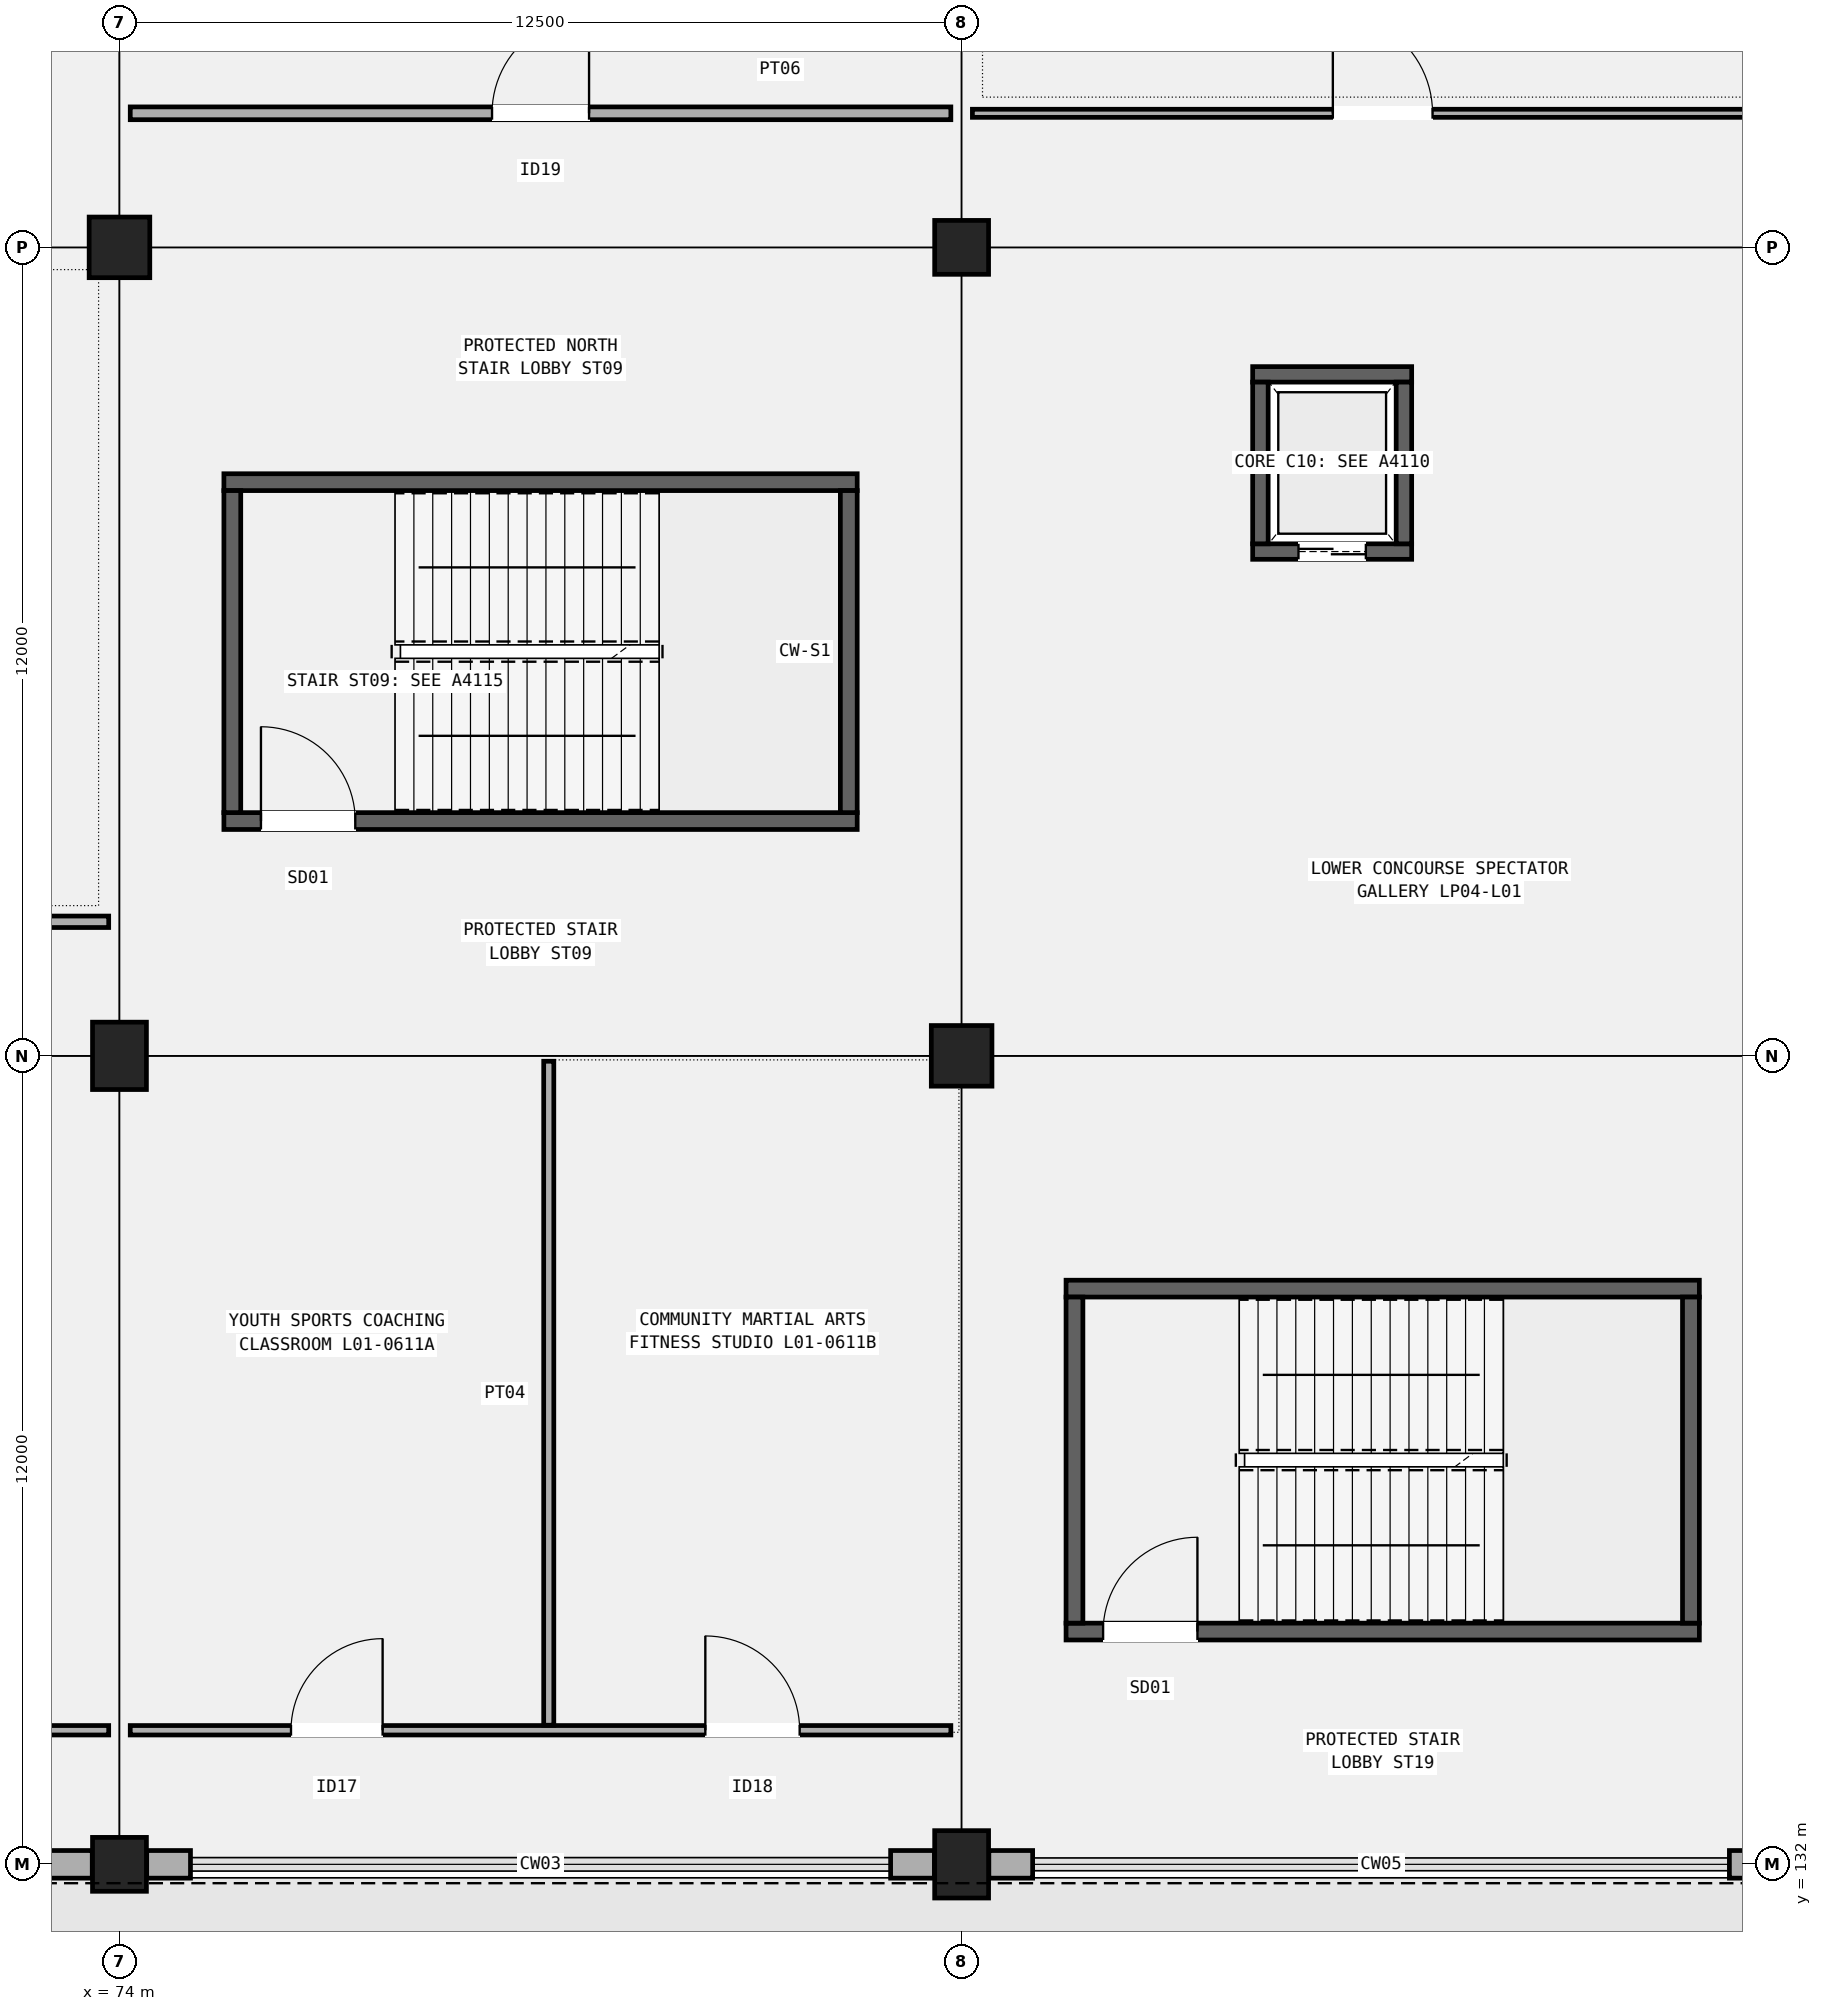
"""IFC4 building model, lengths in metres.
Left out: names, types, materials, properties, quantities, classifications, styles, units other than length and angle.
Written with IfcOpenShell. Run it as: python <this file> out.ifc"""

import sys

from ifc_helpers import new_model, si_unit, direction, frame, frame_2d, origin, origin_2d, place, context, subcontext, project, spatial, rectangle, extrude, element, fill, save


model = new_model("IFC4")
c1 = context("Model", 3, precision=1e-05, world=origin(), true_north=direction((0.0, 1.0)))
c2 = subcontext(c1, "Body", "Model", "MODEL_VIEW")
j1 = project(units=[si_unit("LENGTHUNIT", "METRE"), si_unit("PLANEANGLEUNIT", "RADIAN")], contexts=[c1])
p1 = place(None, origin())
s1 = spatial("IfcSite", under=j1, at=p1, CompositionType="ELEMENT")
p2 = place(p1, origin())
s2 = spatial("IfcBuilding", under=s1, at=p2, CompositionType="ELEMENT")
p3 = place(p2, frame((0.0, 0.0, 5.4)))
s3 = spatial("IfcBuildingStorey", under=s2, at=p3, CompositionType="ELEMENT", Elevation=5.4)
p4 = place(p3, frame((74.0, 132.0, 0.0), z_axis=(0.0, 0.0, 1.0), x_axis=(1.0, 0.0, 0.0)))
e1 = element("IfcColumn", 1, at=p4, inside=s3, PredefinedType="COLUMN", context=c2, shape_type="SweptSolid", body=[
    extrude(rectangle(XDim=0.8, YDim=0.8, at=origin_2d()), origin(), (0.0, 0.0, 1.0), 4.8),
])
p5 = place(p3, frame((74.0, 144.0, 0.0), z_axis=(0.0, 0.0, 1.0), x_axis=(1.0, 0.0, 0.0)))
e2 = element("IfcColumn", 2, at=p5, inside=s3, PredefinedType="COLUMN", context=c2, shape_type="SweptSolid", body=[
    extrude(rectangle(XDim=0.8, YDim=1.0, at=origin_2d()), origin(), (0.0, 0.0, 1.0), 4.8),
])
p6 = place(p3, frame((74.0, 156.0, 0.0), z_axis=(0.0, 0.0, 1.0), x_axis=(1.0, 0.0, 0.0)))
e3 = element("IfcColumn", 3, at=p6, inside=s3, PredefinedType="COLUMN", context=c2, shape_type="SweptSolid", body=[
    extrude(rectangle(XDim=0.9, YDim=0.9, at=origin_2d()), origin(), (0.0, 0.0, 1.0), 4.8),
])
p7 = place(p3, frame((86.5, 132.0, 0.0), z_axis=(0.0, 0.0, 1.0), x_axis=(1.0, 0.0, 0.0)))
e4 = element("IfcColumn", 4, at=p7, inside=s3, PredefinedType="COLUMN", context=c2, shape_type="SweptSolid", body=[
    extrude(rectangle(XDim=0.8, YDim=1.0, at=origin_2d()), origin(), (0.0, 0.0, 1.0), 4.8),
])
p8 = place(p3, frame((86.5, 144.0, 0.0), z_axis=(0.0, 0.0, 1.0), x_axis=(1.0, 0.0, 0.0)))
e5 = element("IfcColumn", 5, at=p8, inside=s3, PredefinedType="COLUMN", context=c2, shape_type="SweptSolid", body=[
    extrude(rectangle(XDim=0.9, YDim=0.9, at=origin_2d()), origin(), (0.0, 0.0, 1.0), 4.8),
])
p9 = place(p3, frame((86.5, 156.0, 0.0), z_axis=(0.0, 0.0, 1.0), x_axis=(1.0, 0.0, 0.0)))
e6 = element("IfcColumn", 6, at=p9, inside=s3, PredefinedType="COLUMN", context=c2, shape_type="SweptSolid", body=[
    extrude(rectangle(XDim=0.8, YDim=0.8, at=origin_2d()), origin(), (0.0, 0.0, 1.0), 4.8),
])
p10 = place(p3, frame((72.946, 132.0, 0.0), z_axis=(0.0, 0.0, 1.0), x_axis=(1.0, 0.0, 0.0)))
e7 = element("IfcWall", 7, at=p10, inside=s3, PredefinedType="SOLIDWALL", context=c2, shape_type="SweptSolid", body=[
    extrude(rectangle(XDim=0.65, YDim=0.41, at=frame_2d((0.325, 0.0))), origin(), (0.0, 0.0, 1.0), 4.15),
])
for number, where, z_axis, x_axis in (
    (8, (74.404, 132.0, 0.0), (0.0, 0.0, 1.0), (1.0, 0.0, 0.0)),
    (9, (85.446, 132.0, 0.0), (0.0, 0.0, 1.0), (1.0, 0.0, 0.0)),
):
    element("IfcWall", number, at=place(p3, frame(where, z_axis=z_axis, x_axis=x_axis)), inside=s3, PredefinedType="SOLIDWALL", context=c2, shape_type="SweptSolid", body=[
        extrude(rectangle(XDim=0.65, YDim=0.41, at=frame_2d((0.325, 0.0))), origin(), (0.0, 0.0, 1.0), 4.2),
    ])
for number, where, z_axis, x_axis in (
    (10, (86.904, 132.0, 0.0), (0.0, 0.0, 1.0), (1.0, 0.0, 0.0)),
    (11, (97.896, 132.0, 0.0), (0.0, 0.0, 1.0), (1.0, 0.0, 0.0)),
):
    element("IfcWall", number, at=place(p3, frame(where, z_axis=z_axis, x_axis=x_axis)), inside=s3, PredefinedType="SOLIDWALL", context=c2, shape_type="SweptSolid", body=[
        extrude(rectangle(XDim=0.65, YDim=0.41, at=frame_2d((0.325, 0.0))), origin(), (0.0, 0.0, 1.0), 4.15),
    ])
p11 = place(p3, frame((75.55, 147.485, 0.0), z_axis=(0.0, 0.0, 1.0), x_axis=(1.0, 0.0, 0.0)))
e12 = element("IfcWall", 12, at=p11, inside=s3, PredefinedType="SHEAR", context=c2, shape_type="SweptSolid", body=[
    extrude(rectangle(XDim=9.4, YDim=0.25, at=frame_2d((4.7, 0.0))), origin(), (0.0, 0.0, 1.0), 4.55),
])
p12 = place(p11, frame((0.55, 0.0, 0.0)))
e13 = element("IfcOpeningElement", 13, at=p12, cuts=e12, PredefinedType="OPENING", context=c2, shape_type="SweptSolid", body=[
    extrude(rectangle(XDim=1.4, YDim=2.15, at=frame_2d((0.7, 1.075))), frame((0.0, 0.135, 0.0), z_axis=(0.0, -1.0, 0.0), x_axis=(1.0, 0.0, 0.0)), (0.0, 0.0, 1.0), 0.27),
])
p13 = place(p3, frame((75.55, 152.515, 0.0), z_axis=(0.0, 0.0, 1.0), x_axis=(1.0, 0.0, 0.0)))
e14 = element("IfcWall", 14, at=p13, inside=s3, PredefinedType="SHEAR", context=c2, shape_type="SweptSolid", body=[
    extrude(rectangle(XDim=9.4, YDim=0.25, at=frame_2d((4.7, 0.0))), origin(), (0.0, 0.0, 1.0), 4.55),
])
for number, where, z_axis, x_axis in (
    (15, (75.675, 147.61, 0.0), (0.0, 0.0, 1.0), (0.0, 1.0, 0.0)),
    (16, (84.825, 147.61, 0.0), (0.0, 0.0, 1.0), (0.0, 1.0, 0.0)),
):
    element("IfcWall", number, at=place(p3, frame(where, z_axis=z_axis, x_axis=x_axis)), inside=s3, PredefinedType="SHEAR", context=c2, shape_type="SweptSolid", body=[
        extrude(rectangle(XDim=4.78, YDim=0.25, at=frame_2d((2.39, 0.0))), origin(), (0.0, 0.0, 1.0), 4.55),
    ])
p14 = place(p3, frame((88.05, 135.455, 0.0), z_axis=(0.0, 0.0, 1.0), x_axis=(1.0, 0.0, 0.0)))
e17 = element("IfcWall", 17, at=p14, inside=s3, PredefinedType="SHEAR", context=c2, shape_type="SweptSolid", body=[
    extrude(rectangle(XDim=9.4, YDim=0.25, at=frame_2d((4.7, 0.0))), origin(), (0.0, 0.0, 1.0), 4.55),
])
p15 = place(p14, frame((0.55, 0.0, 0.0)))
e18 = element("IfcOpeningElement", 18, at=p15, cuts=e17, PredefinedType="OPENING", context=c2, shape_type="SweptSolid", body=[
    extrude(rectangle(XDim=1.4, YDim=2.15, at=frame_2d((0.7, 1.075))), frame((0.0, 0.135, 0.0), z_axis=(0.0, -1.0, 0.0), x_axis=(1.0, 0.0, 0.0)), (0.0, 0.0, 1.0), 0.27),
])
p16 = place(p3, frame((88.05, 140.545, 0.0), z_axis=(0.0, 0.0, 1.0), x_axis=(1.0, 0.0, 0.0)))
e19 = element("IfcWall", 19, at=p16, inside=s3, PredefinedType="SHEAR", context=c2, shape_type="SweptSolid", body=[
    extrude(rectangle(XDim=9.4, YDim=0.25, at=frame_2d((4.7, 0.0))), origin(), (0.0, 0.0, 1.0), 4.55),
])
for number, where, z_axis, x_axis in (
    (20, (88.175, 135.58, 0.0), (0.0, 0.0, 1.0), (0.0, 1.0, 0.0)),
    (21, (97.325, 135.58, 0.0), (0.0, 0.0, 1.0), (0.0, 1.0, 0.0)),
):
    element("IfcWall", number, at=place(p3, frame(where, z_axis=z_axis, x_axis=x_axis)), inside=s3, PredefinedType="SHEAR", context=c2, shape_type="SweptSolid", body=[
        extrude(rectangle(XDim=4.84, YDim=0.25, at=frame_2d((2.42, 0.0))), origin(), (0.0, 0.0, 1.0), 4.55),
    ])
p17 = place(p3, frame((90.82, 151.485, 0.0), z_axis=(0.0, 0.0, 1.0), x_axis=(1.0, 0.0, 0.0)))
e22 = element("IfcWall", 22, at=p17, inside=s3, PredefinedType="SHEAR", context=c2, shape_type="SweptSolid", body=[
    extrude(rectangle(XDim=2.36, YDim=0.23, at=frame_2d((1.18, 0.0))), origin(), (0.0, 0.0, 1.0), 4.55),
])
p18 = place(p17, frame((0.68, 0.0, 0.0)))
e23 = element("IfcOpeningElement", 23, at=p18, cuts=e22, PredefinedType="OPENING", context=c2, shape_type="SweptSolid", body=[
    extrude(rectangle(XDim=1.0, YDim=2.15, at=frame_2d((0.5, 1.075))), frame((0.0, 0.125, 0.0), z_axis=(0.0, -1.0, 0.0), x_axis=(1.0, 0.0, 0.0)), (0.0, 0.0, 1.0), 0.25),
])
p19 = place(p3, frame((90.82, 154.115, 0.0), z_axis=(0.0, 0.0, 1.0), x_axis=(1.0, 0.0, 0.0)))
e24 = element("IfcWall", 24, at=p19, inside=s3, PredefinedType="SHEAR", context=c2, shape_type="SweptSolid", body=[
    extrude(rectangle(XDim=2.36, YDim=0.23, at=frame_2d((1.18, 0.0))), origin(), (0.0, 0.0, 1.0), 4.55),
])
for number, where, z_axis, x_axis in (
    (25, (90.935, 151.6, 0.0), (0.0, 0.0, 1.0), (0.0, 1.0, 0.0)),
    (26, (93.065, 151.6, 0.0), (0.0, 0.0, 1.0), (0.0, 1.0, 0.0)),
):
    element("IfcWall", number, at=place(p3, frame(where, z_axis=z_axis, x_axis=x_axis)), inside=s3, PredefinedType="SHEAR", context=c2, shape_type="SweptSolid", body=[
        extrude(rectangle(XDim=2.4, YDim=0.23, at=frame_2d((1.2, 0.0))), origin(), (0.0, 0.0, 1.0), 4.55),
    ])
p20 = place(p3, frame((61.66, 133.99, 0.0), z_axis=(0.0, 0.0, 1.0), x_axis=(1.0, 0.0, 0.0)))
e27 = element("IfcWall", 27, at=p20, inside=s3, PredefinedType="PARTITIONING", context=c2, shape_type="SweptSolid", body=[
    extrude(rectangle(XDim=12.18, YDim=0.14, at=frame_2d((6.09, 0.0))), origin(), (0.0, 0.0, 1.0), 3.92),
])
p21 = place(p20, frame((5.455, 0.0, 0.0)))
e28 = element("IfcOpeningElement", 28, at=p21, cuts=e27, PredefinedType="OPENING", context=c2, shape_type="SweptSolid", body=[
    extrude(rectangle(XDim=1.27, YDim=2.2, at=frame_2d((0.635, 1.1))), frame((0.0, 0.08, 0.0), z_axis=(0.0, -1.0, 0.0), x_axis=(1.0, 0.0, 0.0)), (0.0, 0.0, 1.0), 0.16),
])
p22 = place(p3, frame((61.66, 145.99, 0.0), z_axis=(0.0, 0.0, 1.0), x_axis=(1.0, 0.0, 0.0)))
e29 = element("IfcWall", 29, at=p22, inside=s3, PredefinedType="PARTITIONING", context=c2, shape_type="SweptSolid", body=[
    extrude(rectangle(XDim=12.18, YDim=0.17, at=frame_2d((6.09, 0.0))), origin(), (0.0, 0.0, 1.0), 3.92),
])
p23 = place(p22, frame((5.44, 0.0, 0.0)))
e30 = element("IfcOpeningElement", 30, at=p23, cuts=e29, PredefinedType="OPENING", context=c2, shape_type="SweptSolid", body=[
    extrude(rectangle(XDim=1.3, YDim=2.24, at=frame_2d((0.65, 1.12))), frame((0.0, 0.095, 0.0), z_axis=(0.0, -1.0, 0.0), x_axis=(1.0, 0.0, 0.0)), (0.0, 0.0, 1.0), 0.19),
])
p24 = place(p3, frame((74.16, 133.99, 0.0), z_axis=(0.0, 0.0, 1.0), x_axis=(1.0, 0.0, 0.0)))
e31 = element("IfcWall", 31, at=p24, inside=s3, PredefinedType="PARTITIONING", context=c2, shape_type="SweptSolid", body=[
    extrude(rectangle(XDim=12.18, YDim=0.14, at=frame_2d((6.09, 0.0))), origin(), (0.0, 0.0, 1.0), 3.92),
])
p25 = place(p24, frame((2.386, 0.0, 0.0)))
e32 = element("IfcOpeningElement", 32, at=p25, cuts=e31, PredefinedType="OPENING", context=c2, shape_type="SweptSolid", body=[
    extrude(rectangle(XDim=1.36, YDim=2.25, at=frame_2d((0.68, 1.125))), frame((0.0, 0.08, 0.0), z_axis=(0.0, -1.0, 0.0), x_axis=(1.0, 0.0, 0.0)), (0.0, 0.0, 1.0), 0.16),
])
p26 = place(p24, frame((8.536, 0.0, 0.0)))
e33 = element("IfcOpeningElement", 33, at=p26, cuts=e31, PredefinedType="OPENING", context=c2, shape_type="SweptSolid", body=[
    extrude(rectangle(XDim=1.4, YDim=2.24, at=frame_2d((0.7, 1.12))), frame((0.0, 0.08, 0.0), z_axis=(0.0, -1.0, 0.0), x_axis=(1.0, 0.0, 0.0)), (0.0, 0.0, 1.0), 0.16),
])
p27 = place(p3, frame((80.372, 134.065, 0.0), z_axis=(0.0, 0.0, 1.0), x_axis=(0.0, 1.0, 0.0)))
e34 = element("IfcWall", 34, at=p27, inside=s3, PredefinedType="PARTITIONING", context=c2, shape_type="SweptSolid", body=[
    extrude(rectangle(XDim=9.855, YDim=0.15, at=frame_2d((4.927, 0.0))), origin(), (0.0, 0.0, 1.0), 3.92),
])
p28 = place(p3, frame((74.16, 157.99, 0.0), z_axis=(0.0, 0.0, 1.0), x_axis=(1.0, 0.0, 0.0)))
e35 = element("IfcWall", 35, at=p28, inside=s3, PredefinedType="PARTITIONING", context=c2, shape_type="SweptSolid", body=[
    extrude(rectangle(XDim=12.18, YDim=0.19, at=frame_2d((6.09, 0.0))), origin(), (0.0, 0.0, 1.0), 3.92),
])
p29 = place(p28, frame((5.37, 0.0, 0.0)))
e36 = element("IfcOpeningElement", 36, at=p29, cuts=e35, PredefinedType="OPENING", context=c2, shape_type="SweptSolid", body=[
    extrude(rectangle(XDim=1.44, YDim=2.26, at=frame_2d((0.72, 1.13))), frame((0.0, 0.105, 0.0), z_axis=(0.0, -1.0, 0.0), x_axis=(1.0, 0.0, 0.0)), (0.0, 0.0, 1.0), 0.21),
])
p30 = place(p3, frame((86.66, 157.99, 0.0), z_axis=(0.0, 0.0, 1.0), x_axis=(1.0, 0.0, 0.0)))
e37 = element("IfcWall", 37, at=p30, inside=s3, PredefinedType="PARTITIONING", context=c2, shape_type="SweptSolid", body=[
    extrude(rectangle(XDim=12.18, YDim=0.12, at=frame_2d((6.09, 0.0))), origin(), (0.0, 0.0, 1.0), 3.92),
])
p31 = place(p30, frame((5.35, 0.0, 0.0)))
e38 = element("IfcOpeningElement", 38, at=p31, cuts=e37, PredefinedType="OPENING", context=c2, shape_type="SweptSolid", body=[
    extrude(rectangle(XDim=1.48, YDim=2.24, at=frame_2d((0.74, 1.12))), frame((0.0, 0.07, 0.0), z_axis=(0.0, -1.0, 0.0), x_axis=(1.0, 0.0, 0.0)), (0.0, 0.0, 1.0), 0.14),
])
p32 = place(p12, origin())
e39 = element("IfcDoor", 39, at=p32, inside=s3, OperationType="SINGLE_SWING_LEFT", PredefinedType="DOOR", context=c2, shape_type="SweptSolid", body=[
    extrude(rectangle(XDim=1.4, YDim=2.15, at=frame_2d((0.7, 1.075))), frame((0.0, 0.025, 0.0), z_axis=(0.0, -1.0, 0.0), x_axis=(1.0, 0.0, 0.0)), (0.0, 0.0, 1.0), 0.05),
])
fill(e13, e39)
p33 = place(p15, origin())
e40 = element("IfcDoor", 40, at=p33, inside=s3, OperationType="SINGLE_SWING_RIGHT", PredefinedType="DOOR", context=c2, shape_type="SweptSolid", body=[
    extrude(rectangle(XDim=1.4, YDim=2.15, at=frame_2d((0.7, 1.075))), frame((0.0, 0.025, 0.0), z_axis=(0.0, -1.0, 0.0), x_axis=(1.0, 0.0, 0.0)), (0.0, 0.0, 1.0), 0.05),
])
fill(e18, e40)
p34 = place(p18, origin())
e41 = element("IfcDoor", 41, at=p34, inside=s3, OperationType="DOUBLE_DOOR_SLIDING", PredefinedType="DOOR", context=c2, shape_type="SweptSolid", body=[
    extrude(rectangle(XDim=1.0, YDim=2.15, at=frame_2d((0.5, 1.075))), frame((0.0, 0.025, 0.0), z_axis=(0.0, -1.0, 0.0), x_axis=(1.0, 0.0, 0.0)), (0.0, 0.0, 1.0), 0.05),
])
fill(e23, e41)
p35 = place(p25, origin())
e42 = element("IfcDoor", 42, at=p35, inside=s3, OperationType="SINGLE_SWING_RIGHT", PredefinedType="DOOR", context=c2, shape_type="SweptSolid", body=[
    extrude(rectangle(XDim=1.36, YDim=2.25, at=frame_2d((0.68, 1.125))), frame((0.0, 0.025, 0.0), z_axis=(0.0, -1.0, 0.0), x_axis=(1.0, 0.0, 0.0)), (0.0, 0.0, 1.0), 0.05),
])
fill(e32, e42)
p36 = place(p26, origin())
e43 = element("IfcDoor", 43, at=p36, inside=s3, OperationType="SINGLE_SWING_LEFT", PredefinedType="DOOR", context=c2, shape_type="SweptSolid", body=[
    extrude(rectangle(XDim=1.4, YDim=2.24, at=frame_2d((0.7, 1.12))), frame((0.0, 0.025, 0.0), z_axis=(0.0, -1.0, 0.0), x_axis=(1.0, 0.0, 0.0)), (0.0, 0.0, 1.0), 0.05),
])
fill(e33, e43)
p37 = place(p29, origin())
e44 = element("IfcDoor", 44, at=p37, inside=s3, OperationType="SINGLE_SWING_RIGHT", PredefinedType="DOOR", context=c2, shape_type="SweptSolid", body=[
    extrude(rectangle(XDim=1.44, YDim=2.26, at=frame_2d((0.72, 1.13))), frame((0.0, 0.025, 0.0), z_axis=(0.0, -1.0, 0.0), x_axis=(1.0, 0.0, 0.0)), (0.0, 0.0, 1.0), 0.05),
])
fill(e36, e44)
p38 = place(p31, origin())
e45 = element("IfcDoor", 45, at=p38, inside=s3, OperationType="SINGLE_SWING_LEFT", PredefinedType="DOOR", context=c2, shape_type="SweptSolid", body=[
    extrude(rectangle(XDim=1.48, YDim=2.24, at=frame_2d((0.74, 1.12))), frame((0.0, 0.025, 0.0), z_axis=(0.0, -1.0, 0.0), x_axis=(1.0, 0.0, 0.0)), (0.0, 0.0, 1.0), 0.05),
])
fill(e38, e45)
save(model, sys.argv[1])
